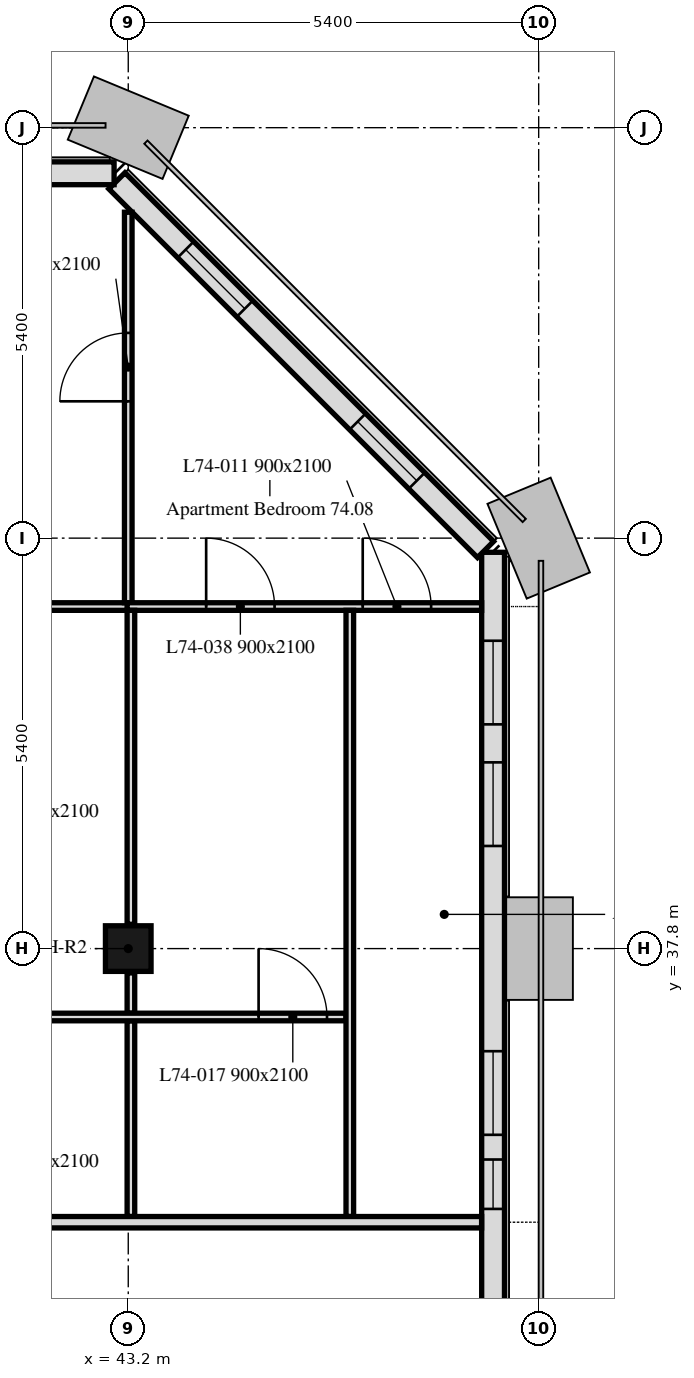
"""IFC4 building model, lengths in metres.
Left out: names, types, materials, properties, quantities, classifications, styles, units other than length and angle.
Written with IfcOpenShell. Run it as: python <this file> out.ifc"""

import sys

from ifc_helpers import new_model, si_unit, direction, frame, frame_2d, origin, origin_2d, place, context, subcontext, project, spatial, rectangle, extrude, element, fill, save


model = new_model("IFC4")
c1 = context("Model", 3, precision=1e-05, world=origin(), true_north=direction((0.0, 1.0)))
c2 = subcontext(c1, "Body", "Model", "MODEL_VIEW")
j1 = project(units=[si_unit("LENGTHUNIT", "METRE"), si_unit("PLANEANGLEUNIT", "RADIAN")], contexts=[c1])
p1 = place(None, origin())
s1 = spatial("IfcSite", under=j1, at=p1, CompositionType="ELEMENT")
p2 = place(p1, origin())
s2 = spatial("IfcBuilding", under=s1, at=p2, CompositionType="ELEMENT")
p3 = place(p2, frame((0.0, 0.0, 298.3)))
s3 = spatial("IfcBuildingStorey", under=s2, at=p3, CompositionType="ELEMENT", Elevation=298.3)
p4 = place(p3, frame((43.2, 37.8, 0.0), z_axis=(0.0, 0.0, 1.0), x_axis=(1.0, 0.0, 0.0)))
e1 = element("IfcColumn", 1, at=p4, inside=s3, PredefinedType="COLUMN", context=c2, shape_type="SweptSolid", body=[
    extrude(rectangle(XDim=0.6, YDim=0.6, at=origin_2d()), origin(), (0.0, 0.0, 1.0), 3.0),
])
p5 = place(p3, frame((48.0, 10.986, 0.0), z_axis=(0.0, 0.0, 1.0), x_axis=(0.0, 1.0, 0.0)))
e2 = element("IfcWall", 2, at=p5, inside=s3, PredefinedType="SOLIDWALL", context=c2, shape_type="SweptSolid", body=[
    extrude(rectangle(XDim=32.027, YDim=0.3, at=frame_2d((16.014, 0.0))), origin(), (0.0, 0.0, 1.0), 3.0),
])
p6 = place(p5, frame((1.314, 0.0, 0.9)))
e3 = element("IfcOpeningElement", 3, at=p6, cuts=e2, PredefinedType="OPENING", context=c2, shape_type="SweptSolid", body=[
    extrude(rectangle(XDim=1.1, YDim=1.7, at=frame_2d((0.55, 0.85))), frame((0.0, 0.16, 0.0), z_axis=(0.0, -1.0, 0.0), x_axis=(1.0, 0.0, 0.0)), (0.0, 0.0, 1.0), 0.32),
])
p7 = place(p5, frame((2.589, 0.0, 0.9)))
e4 = element("IfcOpeningElement", 4, at=p7, cuts=e2, PredefinedType="OPENING", context=c2, shape_type="SweptSolid", body=[
    extrude(rectangle(XDim=0.65, YDim=1.7, at=frame_2d((0.325, 0.85))), frame((0.0, 0.16, 0.0), z_axis=(0.0, -1.0, 0.0), x_axis=(1.0, 0.0, 0.0)), (0.0, 0.0, 1.0), 0.32),
])
p8 = place(p5, frame((6.214, 0.0, 0.9)))
e5 = element("IfcOpeningElement", 5, at=p8, cuts=e2, PredefinedType="OPENING", context=c2, shape_type="SweptSolid", body=[
    extrude(rectangle(XDim=3.4, YDim=1.7, at=frame_2d((1.7, 0.85))), frame((0.0, 0.16, 0.0), z_axis=(0.0, -1.0, 0.0), x_axis=(1.0, 0.0, 0.0)), (0.0, 0.0, 1.0), 0.32),
])
p9 = place(p5, frame((11.964, 0.0, 0.9)))
e6 = element("IfcOpeningElement", 6, at=p9, cuts=e2, PredefinedType="OPENING", context=c2, shape_type="SweptSolid", body=[
    extrude(rectangle(XDim=1.1, YDim=1.7, at=frame_2d((0.55, 0.85))), frame((0.0, 0.16, 0.0), z_axis=(0.0, -1.0, 0.0), x_axis=(1.0, 0.0, 0.0)), (0.0, 0.0, 1.0), 0.32),
])
p10 = place(p5, frame((13.564, 0.0, 0.9)))
e7 = element("IfcOpeningElement", 7, at=p10, cuts=e2, PredefinedType="OPENING", context=c2, shape_type="SweptSolid", body=[
    extrude(rectangle(XDim=1.1, YDim=1.7, at=frame_2d((0.55, 0.85))), frame((0.0, 0.16, 0.0), z_axis=(0.0, -1.0, 0.0), x_axis=(1.0, 0.0, 0.0)), (0.0, 0.0, 1.0), 0.32),
])
p11 = place(p5, frame((17.014, 0.0, 0.9)))
e8 = element("IfcOpeningElement", 8, at=p11, cuts=e2, PredefinedType="OPENING", context=c2, shape_type="SweptSolid", body=[
    extrude(rectangle(XDim=3.4, YDim=1.7, at=frame_2d((1.7, 0.85))), frame((0.0, 0.16, 0.0), z_axis=(0.0, -1.0, 0.0), x_axis=(1.0, 0.0, 0.0)), (0.0, 0.0, 1.0), 0.32),
])
p12 = place(p5, frame((23.389, 0.0, 0.9)))
e9 = element("IfcOpeningElement", 9, at=p12, cuts=e2, PredefinedType="OPENING", context=c2, shape_type="SweptSolid", body=[
    extrude(rectangle(XDim=0.65, YDim=1.7, at=frame_2d((0.325, 0.85))), frame((0.0, 0.16, 0.0), z_axis=(0.0, -1.0, 0.0), x_axis=(1.0, 0.0, 0.0)), (0.0, 0.0, 1.0), 0.32),
])
p13 = place(p5, frame((24.364, 0.0, 0.9)))
e10 = element("IfcOpeningElement", 10, at=p13, cuts=e2, PredefinedType="OPENING", context=c2, shape_type="SweptSolid", body=[
    extrude(rectangle(XDim=1.1, YDim=1.7, at=frame_2d((0.55, 0.85))), frame((0.0, 0.16, 0.0), z_axis=(0.0, -1.0, 0.0), x_axis=(1.0, 0.0, 0.0)), (0.0, 0.0, 1.0), 0.32),
])
p14 = place(p5, frame((28.164, 0.0, 0.9)))
e11 = element("IfcOpeningElement", 11, at=p14, cuts=e2, PredefinedType="OPENING", context=c2, shape_type="SweptSolid", body=[
    extrude(rectangle(XDim=1.1, YDim=1.7, at=frame_2d((0.55, 0.85))), frame((0.0, 0.16, 0.0), z_axis=(0.0, -1.0, 0.0), x_axis=(1.0, 0.0, 0.0)), (0.0, 0.0, 1.0), 0.32),
])
p15 = place(p5, frame((29.764, 0.0, 0.9)))
e12 = element("IfcOpeningElement", 12, at=p15, cuts=e2, PredefinedType="OPENING", context=c2, shape_type="SweptSolid", body=[
    extrude(rectangle(XDim=1.1, YDim=1.7, at=frame_2d((0.55, 0.85))), frame((0.0, 0.16, 0.0), z_axis=(0.0, -1.0, 0.0), x_axis=(1.0, 0.0, 0.0)), (0.0, 0.0, 1.0), 0.32),
])
p16 = place(p3, frame((47.901, 43.051, 0.0), z_axis=(0.0, 0.0, 1.0), x_axis=(-0.707106781187, 0.707106781187, 0.0)))
e13 = element("IfcWall", 13, at=p16, inside=s3, PredefinedType="SOLIDWALL", context=c2, shape_type="SweptSolid", body=[
    extrude(rectangle(XDim=6.86, YDim=0.3, at=frame_2d((3.43, 0.0))), origin(), (0.0, 0.0, 1.0), 3.0),
])
p17 = place(p16, frame((1.28, 0.0, 0.9)))
e14 = element("IfcOpeningElement", 14, at=p17, cuts=e13, PredefinedType="OPENING", context=c2, shape_type="SweptSolid", body=[
    extrude(rectangle(XDim=1.1, YDim=1.7, at=frame_2d((0.55, 0.85))), frame((0.0, 0.16, 0.0), z_axis=(0.0, -1.0, 0.0), x_axis=(1.0, 0.0, 0.0)), (0.0, 0.0, 1.0), 0.32),
])
p18 = place(p16, frame((4.48, 0.0, 0.9)))
e15 = element("IfcOpeningElement", 15, at=p18, cuts=e13, PredefinedType="OPENING", context=c2, shape_type="SweptSolid", body=[
    extrude(rectangle(XDim=1.1, YDim=1.7, at=frame_2d((0.55, 0.85))), frame((0.0, 0.16, 0.0), z_axis=(0.0, -1.0, 0.0), x_axis=(1.0, 0.0, 0.0)), (0.0, 0.0, 1.0), 0.32),
])
p19 = place(p3, frame((43.014, 48.0, 0.0), z_axis=(0.0, 0.0, 1.0), x_axis=(-1.0, 0.0, 0.0)))
e16 = element("IfcWall", 16, at=p19, inside=s3, PredefinedType="SOLIDWALL", context=c2, shape_type="SweptSolid", body=[
    extrude(rectangle(XDim=32.027, YDim=0.3, at=frame_2d((16.014, 0.0))), origin(), (0.0, 0.0, 1.0), 3.0),
])
p20 = place(p19, frame((2.764, 0.0, 0.9)))
e17 = element("IfcOpeningElement", 17, at=p20, cuts=e16, PredefinedType="OPENING", context=c2, shape_type="SweptSolid", body=[
    extrude(rectangle(XDim=1.1, YDim=1.7, at=frame_2d((0.55, 0.85))), frame((0.0, 0.16, 0.0), z_axis=(0.0, -1.0, 0.0), x_axis=(1.0, 0.0, 0.0)), (0.0, 0.0, 1.0), 0.32),
])
p21 = place(p19, frame((6.214, 0.0, 0.9)))
e18 = element("IfcOpeningElement", 18, at=p21, cuts=e16, PredefinedType="OPENING", context=c2, shape_type="SweptSolid", body=[
    extrude(rectangle(XDim=3.4, YDim=1.7, at=frame_2d((1.7, 0.85))), frame((0.0, 0.16, 0.0), z_axis=(0.0, -1.0, 0.0), x_axis=(1.0, 0.0, 0.0)), (0.0, 0.0, 1.0), 0.32),
])
p22 = place(p19, frame((13.564, 0.0, 0.9)))
e19 = element("IfcOpeningElement", 19, at=p22, cuts=e16, PredefinedType="OPENING", context=c2, shape_type="SweptSolid", body=[
    extrude(rectangle(XDim=1.1, YDim=1.7, at=frame_2d((0.55, 0.85))), frame((0.0, 0.16, 0.0), z_axis=(0.0, -1.0, 0.0), x_axis=(1.0, 0.0, 0.0)), (0.0, 0.0, 1.0), 0.32),
])
p23 = place(p19, frame((17.014, 0.0, 0.9)))
e20 = element("IfcOpeningElement", 20, at=p23, cuts=e16, PredefinedType="OPENING", context=c2, shape_type="SweptSolid", body=[
    extrude(rectangle(XDim=3.4, YDim=1.7, at=frame_2d((1.7, 0.85))), frame((0.0, 0.16, 0.0), z_axis=(0.0, -1.0, 0.0), x_axis=(1.0, 0.0, 0.0)), (0.0, 0.0, 1.0), 0.32),
])
p24 = place(p19, frame((24.364, 0.0, 0.9)))
e21 = element("IfcOpeningElement", 21, at=p24, cuts=e16, PredefinedType="OPENING", context=c2, shape_type="SweptSolid", body=[
    extrude(rectangle(XDim=1.1, YDim=1.7, at=frame_2d((0.55, 0.85))), frame((0.0, 0.16, 0.0), z_axis=(0.0, -1.0, 0.0), x_axis=(1.0, 0.0, 0.0)), (0.0, 0.0, 1.0), 0.32),
])
p25 = place(p19, frame((27.814, 0.0, 0.9)))
e22 = element("IfcOpeningElement", 22, at=p25, cuts=e16, PredefinedType="OPENING", context=c2, shape_type="SweptSolid", body=[
    extrude(rectangle(XDim=3.4, YDim=1.7, at=frame_2d((1.7, 0.85))), frame((0.0, 0.16, 0.0), z_axis=(0.0, -1.0, 0.0), x_axis=(1.0, 0.0, 0.0)), (0.0, 0.0, 1.0), 0.32),
])
p26 = place(p3, frame((37.85, 42.3, 0.0), z_axis=(0.0, 0.0, 1.0), x_axis=(1.0, 0.0, 0.0)))
e23 = element("IfcWall", 23, at=p26, inside=s3, PredefinedType="PARTITIONING", context=c2, shape_type="SweptSolid", body=[
    extrude(rectangle(XDim=5.4, YDim=0.1, at=frame_2d((2.7, 0.0))), origin(), (0.0, 0.0, 1.0), 3.0),
])
p27 = place(p26, frame((1.335, 0.0, 0.0)))
e24 = element("IfcOpeningElement", 24, at=p27, cuts=e23, PredefinedType="OPENING", context=c2, shape_type="SweptSolid", body=[
    extrude(rectangle(XDim=0.9, YDim=2.1, at=frame_2d((0.45, 1.05))), frame((0.0, 0.05, 0.0), z_axis=(0.0, -1.0, 0.0), x_axis=(1.0, 0.0, 0.0)), (0.0, 0.0, 1.0), 0.1),
])
p28 = place(p3, frame((43.2, 42.35, 0.0), z_axis=(0.0, 0.0, 1.0), x_axis=(0.0, 1.0, 0.0)))
e25 = element("IfcWall", 25, at=p28, inside=s3, PredefinedType="PARTITIONING", context=c2, shape_type="SweptSolid", body=[
    extrude(rectangle(XDim=5.138, YDim=0.1, at=frame_2d((2.569, 0.0))), origin(), (0.0, 0.0, 1.0), 3.0),
])
p29 = place(p28, frame((2.65, 0.0, 0.0)))
e26 = element("IfcOpeningElement", 26, at=p29, cuts=e25, PredefinedType="OPENING", context=c2, shape_type="SweptSolid", body=[
    extrude(rectangle(XDim=0.9, YDim=2.1, at=frame_2d((0.45, 1.05))), frame((0.0, 0.05, 0.0), z_axis=(0.0, -1.0, 0.0), x_axis=(1.0, 0.0, 0.0)), (0.0, 0.0, 1.0), 0.1),
])
p30 = place(p3, frame((43.185, 42.3, 0.0), z_axis=(0.0, 0.0, 1.0), x_axis=(1.0, 0.0, 0.0)))
e27 = element("IfcWall", 27, at=p30, inside=s3, PredefinedType="PARTITIONING", context=c2, shape_type="SweptSolid", body=[
    extrude(rectangle(XDim=4.664, YDim=0.1, at=frame_2d((2.332, 0.0))), origin(), (0.0, 0.0, 1.0), 3.0),
])
p31 = place(p30, frame((3.1, 0.0, 0.0)))
e28 = element("IfcOpeningElement", 28, at=p31, cuts=e27, PredefinedType="OPENING", context=c2, shape_type="SweptSolid", body=[
    extrude(rectangle(XDim=0.9, YDim=2.1, at=frame_2d((0.45, 1.05))), frame((0.0, 0.05, 0.0), z_axis=(0.0, -1.0, 0.0), x_axis=(1.0, 0.0, 0.0)), (0.0, 0.0, 1.0), 0.1),
])
p32 = place(p30, frame((1.04, 0.0, 0.0)))
e29 = element("IfcOpeningElement", 29, at=p32, cuts=e27, PredefinedType="OPENING", context=c2, shape_type="SweptSolid", body=[
    extrude(rectangle(XDim=0.9, YDim=2.1, at=frame_2d((0.45, 1.05))), frame((0.0, 0.05, 0.0), z_axis=(0.0, -1.0, 0.0), x_axis=(1.0, 0.0, 0.0)), (0.0, 0.0, 1.0), 0.1),
])
p33 = place(p3, frame((43.235, 36.95, 0.0), z_axis=(0.0, 0.0, 1.0), x_axis=(0.0, 1.0, 0.0)))
e30 = element("IfcWall", 30, at=p33, inside=s3, PredefinedType="PARTITIONING", context=c2, shape_type="SweptSolid", body=[
    extrude(rectangle(XDim=0.53, YDim=0.1, at=frame_2d((0.265, 0.0))), origin(), (0.0, 0.0, 1.0), 3.0),
])
p34 = place(p3, frame((43.235, 38.12, 0.0), z_axis=(0.0, 0.0, 1.0), x_axis=(0.0, 1.0, 0.0)))
e31 = element("IfcWall", 31, at=p34, inside=s3, PredefinedType="PARTITIONING", context=c2, shape_type="SweptSolid", body=[
    extrude(rectangle(XDim=4.13, YDim=0.1, at=frame_2d((2.065, 0.0))), origin(), (0.0, 0.0, 1.0), 3.0),
])
p35 = place(p3, frame((43.235, 34.275, 0.0), z_axis=(0.0, 0.0, 1.0), x_axis=(0.0, 1.0, 0.0)))
e32 = element("IfcWall", 32, at=p35, inside=s3, PredefinedType="PARTITIONING", context=c2, shape_type="SweptSolid", body=[
    extrude(rectangle(XDim=2.575, YDim=0.1, at=frame_2d((1.288, 0.0))), origin(), (0.0, 0.0, 1.0), 3.0),
])
p36 = place(p3, frame((40.435, 36.9, 0.0), z_axis=(0.0, 0.0, 1.0), x_axis=(1.0, 0.0, 0.0)))
e33 = element("IfcWall", 33, at=p36, inside=s3, PredefinedType="PARTITIONING", context=c2, shape_type="SweptSolid", body=[
    extrude(rectangle(XDim=5.63, YDim=0.1, at=frame_2d((2.815, 0.0))), origin(), (0.0, 0.0, 1.0), 3.0),
])
p37 = place(p36, frame((4.48, 0.0, 0.0)))
e34 = element("IfcOpeningElement", 34, at=p37, cuts=e33, PredefinedType="OPENING", context=c2, shape_type="SweptSolid", body=[
    extrude(rectangle(XDim=0.9, YDim=2.1, at=frame_2d((0.45, 1.05))), frame((0.0, 0.05, 0.0), z_axis=(0.0, -1.0, 0.0), x_axis=(1.0, 0.0, 0.0)), (0.0, 0.0, 1.0), 0.1),
])
p38 = place(p3, frame((46.115, 34.275, 0.0), z_axis=(0.0, 0.0, 1.0), x_axis=(0.0, 1.0, 0.0)))
e35 = element("IfcWall", 35, at=p38, inside=s3, PredefinedType="PARTITIONING", context=c2, shape_type="SweptSolid", body=[
    extrude(rectangle(XDim=7.975, YDim=0.1, at=frame_2d((3.988, 0.0))), origin(), (0.0, 0.0, 1.0), 2.4),
])
p39 = place(p3, frame((6.151, 34.2, 0.0), z_axis=(0.0, 0.0, 1.0), x_axis=(1.0, 0.0, 0.0)))
e36 = element("IfcWall", 36, at=p39, inside=s3, PredefinedType="PARTITIONING", context=c2, shape_type="SweptSolid", body=[
    extrude(rectangle(XDim=41.698, YDim=0.15, at=frame_2d((20.849, 0.0))), origin(), (0.0, 0.0, 1.0), 2.4),
])
p40 = place(p39, frame((2.939, 0.0, 0.0)))
e37 = element("IfcOpeningElement", 37, at=p40, cuts=e36, PredefinedType="OPENING", context=c2, shape_type="SweptSolid", body=[
    extrude(rectangle(XDim=1.0, YDim=2.1, at=frame_2d((0.5, 1.05))), frame((0.0, 0.075, 0.0), z_axis=(0.0, -1.0, 0.0), x_axis=(1.0, 0.0, 0.0)), (0.0, 0.0, 1.0), 0.15),
])
p41 = place(p39, frame((18.121, 0.0, 0.0)))
e38 = element("IfcOpeningElement", 38, at=p41, cuts=e36, PredefinedType="OPENING", context=c2, shape_type="SweptSolid", body=[
    extrude(rectangle(XDim=1.0, YDim=2.1, at=frame_2d((0.5, 1.05))), frame((0.0, 0.075, 0.0), z_axis=(0.0, -1.0, 0.0), x_axis=(1.0, 0.0, 0.0)), (0.0, 0.0, 1.0), 0.15),
])
p42 = place(p39, frame((32.359, 0.0, 0.0)))
e39 = element("IfcOpeningElement", 39, at=p42, cuts=e36, PredefinedType="OPENING", context=c2, shape_type="SweptSolid", body=[
    extrude(rectangle(XDim=1.0, YDim=2.1, at=frame_2d((0.5, 1.05))), frame((0.0, 0.075, 0.0), z_axis=(0.0, -1.0, 0.0), x_axis=(1.0, 0.0, 0.0)), (0.0, 0.0, 1.0), 0.15),
])
p43 = place(p12, origin())
e40 = element("IfcWindow", 40, at=p43, inside=s3, PartitioningType="SINGLE_PANEL", PredefinedType="WINDOW", context=c2, shape_type="SweptSolid", body=[
    extrude(rectangle(XDim=0.65, YDim=1.7, at=frame_2d((0.325, 0.85))), frame((0.0, 0.03, 0.0), z_axis=(0.0, -1.0, 0.0), x_axis=(1.0, 0.0, 0.0)), (0.0, 0.0, 1.0), 0.06),
])
fill(e9, e40)
p44 = place(p13, origin())
e41 = element("IfcWindow", 41, at=p44, inside=s3, PartitioningType="SINGLE_PANEL", PredefinedType="WINDOW", context=c2, shape_type="SweptSolid", body=[
    extrude(rectangle(XDim=1.1, YDim=1.7, at=frame_2d((0.55, 0.85))), frame((0.0, 0.03, 0.0), z_axis=(0.0, -1.0, 0.0), x_axis=(1.0, 0.0, 0.0)), (0.0, 0.0, 1.0), 0.06),
])
fill(e10, e41)
p45 = place(p14, origin())
e42 = element("IfcWindow", 42, at=p45, inside=s3, PartitioningType="SINGLE_PANEL", PredefinedType="WINDOW", context=c2, shape_type="SweptSolid", body=[
    extrude(rectangle(XDim=1.1, YDim=1.7, at=frame_2d((0.55, 0.85))), frame((0.0, 0.03, 0.0), z_axis=(0.0, -1.0, 0.0), x_axis=(1.0, 0.0, 0.0)), (0.0, 0.0, 1.0), 0.06),
])
fill(e11, e42)
p46 = place(p15, origin())
e43 = element("IfcWindow", 43, at=p46, inside=s3, PartitioningType="SINGLE_PANEL", PredefinedType="WINDOW", context=c2, shape_type="SweptSolid", body=[
    extrude(rectangle(XDim=1.1, YDim=1.7, at=frame_2d((0.55, 0.85))), frame((0.0, 0.03, 0.0), z_axis=(0.0, -1.0, 0.0), x_axis=(1.0, 0.0, 0.0)), (0.0, 0.0, 1.0), 0.06),
])
fill(e12, e43)
p47 = place(p17, origin())
e44 = element("IfcWindow", 44, at=p47, inside=s3, PartitioningType="SINGLE_PANEL", PredefinedType="WINDOW", context=c2, shape_type="SweptSolid", body=[
    extrude(rectangle(XDim=1.1, YDim=1.7, at=frame_2d((0.55, 0.85))), frame((0.0, 0.03, 0.0), z_axis=(0.0, -1.0, 0.0), x_axis=(1.0, 0.0, 0.0)), (0.0, 0.0, 1.0), 0.06),
])
fill(e14, e44)
p48 = place(p18, origin())
e45 = element("IfcWindow", 45, at=p48, inside=s3, PartitioningType="SINGLE_PANEL", PredefinedType="WINDOW", context=c2, shape_type="SweptSolid", body=[
    extrude(rectangle(XDim=1.1, YDim=1.7, at=frame_2d((0.55, 0.85))), frame((0.0, 0.03, 0.0), z_axis=(0.0, -1.0, 0.0), x_axis=(1.0, 0.0, 0.0)), (0.0, 0.0, 1.0), 0.06),
])
fill(e15, e45)
p49 = place(p31, origin())
e46 = element("IfcDoor", 46, at=p49, inside=s3, OperationType="SINGLE_SWING_RIGHT", PredefinedType="DOOR", context=c2, shape_type="SweptSolid", body=[
    extrude(rectangle(XDim=0.9, YDim=2.1, at=frame_2d((0.45, 1.05))), frame((0.0, 0.025, 0.0), z_axis=(0.0, -1.0, 0.0), x_axis=(1.0, 0.0, 0.0)), (0.0, 0.0, 1.0), 0.05),
])
fill(e28, e46)
p50 = place(p37, origin())
e47 = element("IfcDoor", 47, at=p50, inside=s3, OperationType="SINGLE_SWING_LEFT", PredefinedType="DOOR", context=c2, shape_type="SweptSolid", body=[
    extrude(rectangle(XDim=0.9, YDim=2.1, at=frame_2d((0.45, 1.05))), frame((0.0, 0.025, 0.0), z_axis=(0.0, -1.0, 0.0), x_axis=(1.0, 0.0, 0.0)), (0.0, 0.0, 1.0), 0.05),
])
fill(e34, e47)
p51 = place(p32, origin())
e48 = element("IfcDoor", 48, at=p51, inside=s3, OperationType="SINGLE_SWING_LEFT", PredefinedType="DOOR", context=c2, shape_type="SweptSolid", body=[
    extrude(rectangle(XDim=0.9, YDim=2.1, at=frame_2d((0.45, 1.05))), frame((0.0, 0.025, 0.0), z_axis=(0.0, -1.0, 0.0), x_axis=(1.0, 0.0, 0.0)), (0.0, 0.0, 1.0), 0.05),
])
fill(e29, e48)
p52 = place(p29, origin())
e49 = element("IfcDoor", 49, at=p52, inside=s3, OperationType="SINGLE_SWING_RIGHT", PredefinedType="DOOR", context=c2, shape_type="SweptSolid", body=[
    extrude(rectangle(XDim=0.9, YDim=2.1, at=frame_2d((0.45, 1.05))), frame((0.0, 0.025, 0.0), z_axis=(0.0, -1.0, 0.0), x_axis=(1.0, 0.0, 0.0)), (0.0, 0.0, 1.0), 0.05),
])
fill(e26, e49)
save(model, sys.argv[1])
